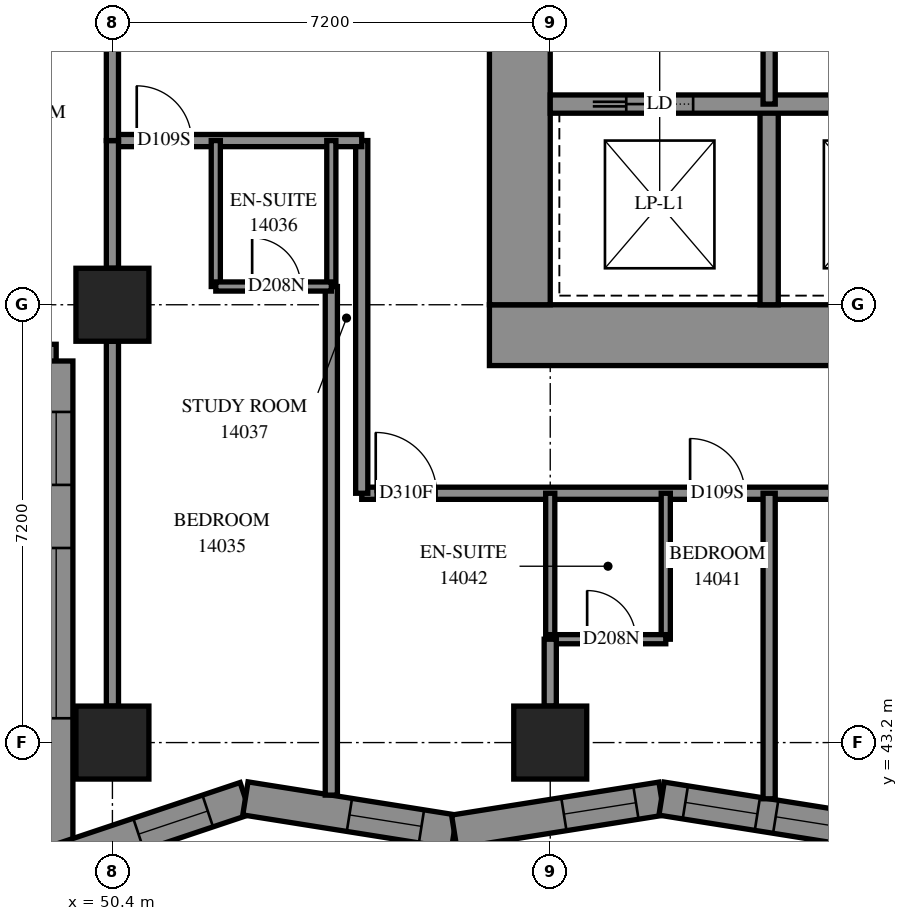
"""IFC4 building model, lengths in metres.
Left out: names, types, materials, properties, quantities, classifications, styles, units other than length and angle.
Written with IfcOpenShell. Run it as: python <this file> out.ifc"""

import sys

from ifc_helpers import new_model, si_unit, direction, frame, frame_2d, origin, origin_2d, place, context, subcontext, project, spatial, polyline, rectangle, outline, extrude, element, fill, save


model = new_model("IFC4")
c1 = context("Model", 3, precision=1e-05, world=origin(), true_north=direction((0.0, 1.0)))
c2 = subcontext(c1, "Body", "Model", "MODEL_VIEW")
j1 = project(units=[si_unit("LENGTHUNIT", "METRE"), si_unit("PLANEANGLEUNIT", "RADIAN")], contexts=[c1])
p1 = place(None, origin())
s1 = spatial("IfcSite", under=j1, at=p1, CompositionType="ELEMENT")
p2 = place(p1, origin())
s2 = spatial("IfcBuilding", under=s1, at=p2, CompositionType="ELEMENT")
p3 = place(p2, frame((0.0, 0.0, 54.2)))
s3 = spatial("IfcBuildingStorey", under=s2, at=p3, CompositionType="ELEMENT", Elevation=54.2)
for number, where, z_axis, x_axis in (
    (1, (50.4, 43.2, 0.0), (0.0, 0.0, 1.0), (1.0, 0.0, 0.0)),
    (2, (50.4, 50.4, 0.0), (0.0, 0.0, 1.0), (1.0, 0.0, 0.0)),
    (3, (57.6, 43.2, 0.0), (0.0, 0.0, 1.0), (1.0, 0.0, 0.0)),
):
    element("IfcColumn", number, at=place(p3, frame(where, z_axis=z_axis, x_axis=x_axis)), inside=s3, PredefinedType="COLUMN", context=c2, shape_type="SweptSolid", body=[
        extrude(rectangle(XDim=1.2, YDim=1.2, at=origin_2d()), origin(), (0.0, 0.0, 1.0), 3.1),
    ])
p4 = place(p3, frame((56.6, 49.9, -0.3), z_axis=(0.0, 0.0, 1.0), x_axis=(1.0, 0.0, 0.0)))
e4 = element("IfcWall", 4, at=p4, inside=s3, PredefinedType="SHEAR", context=c2, shape_type="SweptSolid", body=[
    extrude(rectangle(XDim=16.4, YDim=1.0, at=frame_2d((8.2, 0.0))), origin(), (0.0, 0.0, 1.0), 2.7),
])
p5 = place(p3, frame((57.1, 50.4, -0.3), z_axis=(0.0, 0.0, 1.0), x_axis=(0.0, 1.0, 0.0)))
e5 = element("IfcWall", 5, at=p5, inside=s3, PredefinedType="SHEAR", context=c2, shape_type="SweptSolid", body=[
    extrude(rectangle(XDim=14.4, YDim=1.0, at=frame_2d((7.2, 0.0))), origin(), (0.0, 0.0, 1.0), 2.7),
])
p6 = place(p5, frame((4.55, 0.0, 0.3)))
e6 = element("IfcOpeningElement", 6, at=p6, cuts=e5, PredefinedType="OPENING", context=c2, shape_type="SweptSolid", body=[
    extrude(rectangle(XDim=1.1, YDim=2.1, at=frame_2d((0.55, 1.05))), frame((0.0, 0.51, 0.0), z_axis=(0.0, -1.0, 0.0), x_axis=(1.0, 0.0, 0.0)), (0.0, 0.0, 1.0), 1.02),
])
p7 = place(p5, frame((11.35, 0.0, 0.3)))
e7 = element("IfcOpeningElement", 7, at=p7, cuts=e5, PredefinedType="OPENING", context=c2, shape_type="SweptSolid", body=[
    extrude(rectangle(XDim=1.1, YDim=2.1, at=frame_2d((0.55, 1.05))), frame((0.0, 0.51, 0.0), z_axis=(0.0, -1.0, 0.0), x_axis=(1.0, 0.0, 0.0)), (0.0, 0.0, 1.0), 1.02),
])
p8 = place(p3, frame((61.2, 50.4, 0.0), z_axis=(0.0, 0.0, 1.0), x_axis=(0.0, 1.0, 0.0)))
e8 = element("IfcWall", 8, at=p8, inside=s3, PredefinedType="SOLIDWALL", context=c2, shape_type="SweptSolid", body=[
    extrude(rectangle(XDim=3.3, YDim=0.3, at=frame_2d((1.65, 0.0))), origin(), (0.0, 0.0, 1.0), 3.1),
])
p9 = place(p3, frame((57.6, 53.7, 0.0), z_axis=(0.0, 0.0, 1.0), x_axis=(1.0, 0.0, 0.0)))
e9 = element("IfcWall", 9, at=p9, inside=s3, PredefinedType="SOLIDWALL", context=c2, shape_type="SweptSolid", body=[
    extrude(rectangle(XDim=14.4, YDim=0.3, at=frame_2d((7.2, 0.0))), origin(), (0.0, 0.0, 1.0), 3.1),
])
p10 = place(p9, frame((1.25, 0.0, 0.0)))
e10 = element("IfcOpeningElement", 10, at=p10, cuts=e9, PredefinedType="OPENING", context=c2, shape_type="SweptSolid", body=[
    extrude(rectangle(XDim=1.1, YDim=2.1, at=frame_2d((0.55, 1.05))), frame((0.0, 0.16, 0.0), z_axis=(0.0, -1.0, 0.0), x_axis=(1.0, 0.0, 0.0)), (0.0, 0.0, 1.0), 0.32),
])
p11 = place(p9, frame((4.85, 0.0, 0.0)))
e11 = element("IfcOpeningElement", 11, at=p11, cuts=e9, PredefinedType="OPENING", context=c2, shape_type="SweptSolid", body=[
    extrude(rectangle(XDim=1.1, YDim=2.1, at=frame_2d((0.55, 1.05))), frame((0.0, 0.16, 0.0), z_axis=(0.0, -1.0, 0.0), x_axis=(1.0, 0.0, 0.0)), (0.0, 0.0, 1.0), 0.32),
])
p12 = place(p9, frame((8.45, 0.0, 0.0)))
e12 = element("IfcOpeningElement", 12, at=p12, cuts=e9, PredefinedType="OPENING", context=c2, shape_type="SweptSolid", body=[
    extrude(rectangle(XDim=1.1, YDim=2.1, at=frame_2d((0.55, 1.05))), frame((0.0, 0.16, 0.0), z_axis=(0.0, -1.0, 0.0), x_axis=(1.0, 0.0, 0.0)), (0.0, 0.0, 1.0), 0.32),
])
p13 = place(p9, frame((12.05, 0.0, 0.0)))
e13 = element("IfcOpeningElement", 13, at=p13, cuts=e9, PredefinedType="OPENING", context=c2, shape_type="SweptSolid", body=[
    extrude(rectangle(XDim=1.1, YDim=2.1, at=frame_2d((0.55, 1.05))), frame((0.0, 0.16, 0.0), z_axis=(0.0, -1.0, 0.0), x_axis=(1.0, 0.0, 0.0)), (0.0, 0.0, 1.0), 0.32),
])
p14 = place(p3, frame((42.275, 49.475, 0.0), z_axis=(0.0, 0.0, 1.0), x_axis=(1.0, 0.0, 0.0)))
e14 = element("IfcWall", 14, at=p14, inside=s3, PredefinedType="SOLIDWALL", context=c2, shape_type="SweptSolid", body=[
    extrude(outline(polyline([(-0.275, -0.275), (6.925, -0.275), (7.475, 0.275), (0.275, 0.275), (-0.275, -0.275)])), origin(), (0.0, 0.0, 1.0), 3.1),
])
p15 = place(p14, frame((1.325, 0.0, 0.5)))
e15 = element("IfcOpeningElement", 15, at=p15, cuts=e14, PredefinedType="OPENING", context=c2, shape_type="SweptSolid", body=[
    extrude(rectangle(XDim=2.8, YDim=2.45, at=frame_2d((1.4, 1.225))), frame((0.0, 0.285, 0.0), z_axis=(0.0, -1.0, 0.0), x_axis=(1.0, 0.0, 0.0)), (0.0, 0.0, 1.0), 0.57),
])
p16 = place(p14, frame((5.162, 0.0, 0.5)))
e16 = element("IfcOpeningElement", 16, at=p16, cuts=e14, PredefinedType="OPENING", context=c2, shape_type="SweptSolid", body=[
    extrude(rectangle(XDim=1.2, YDim=2.45, at=frame_2d((0.6, 1.225))), frame((0.0, 0.285, 0.0), z_axis=(0.0, -1.0, 0.0), x_axis=(1.0, 0.0, 0.0)), (0.0, 0.0, 1.0), 0.57),
])
p17 = place(p3, frame((49.475, 49.475, 0.0), z_axis=(0.0, 0.0, 1.0), x_axis=(0.0, -1.0, 0.0)))
e17 = element("IfcWall", 17, at=p17, inside=s3, PredefinedType="SOLIDWALL", context=c2, shape_type="SweptSolid", body=[
    extrude(outline(polyline([(0.275, -0.275), (8.617, -0.275), (7.853, 0.275), (-0.275, 0.275), (0.275, -0.275)])), origin(), (0.0, 0.0, 1.0), 3.1),
])
p18 = place(p17, frame((3.075, 0.0, 0.5)))
e18 = element("IfcOpeningElement", 18, at=p18, cuts=e17, PredefinedType="OPENING", context=c2, shape_type="SweptSolid", body=[
    extrude(rectangle(XDim=2.8, YDim=2.45, at=frame_2d((1.4, 1.225))), frame((0.0, 0.285, 0.0), z_axis=(0.0, -1.0, 0.0), x_axis=(1.0, 0.0, 0.0)), (0.0, 0.0, 1.0), 0.57),
])
p19 = place(p17, frame((0.838, 0.0, 0.5)))
e19 = element("IfcOpeningElement", 19, at=p19, cuts=e17, PredefinedType="OPENING", context=c2, shape_type="SweptSolid", body=[
    extrude(rectangle(XDim=1.2, YDim=2.45, at=frame_2d((0.6, 1.225))), frame((0.0, 0.285, 0.0), z_axis=(0.0, -1.0, 0.0), x_axis=(1.0, 0.0, 0.0)), (0.0, 0.0, 1.0), 0.57),
])
p20 = place(p3, frame((49.475, 41.24, 0.0), z_axis=(0.0, 0.0, 1.0), x_axis=(0.9482466671, 0.3175346568, 0.0)))
e20 = element("IfcWall", 20, at=p20, inside=s3, PredefinedType="SOLIDWALL", context=c2, shape_type="SweptSolid", body=[
    extrude(outline(polyline([(-0.382, -0.275), (3.214, -0.275), (3.349, 0.275), (0.382, 0.275), (-0.382, -0.275)])), origin(), (0.0, 0.0, 1.0), 3.1),
])
p21 = place(p20, frame((1.429, 0.0, 0.5)))
e21 = element("IfcOpeningElement", 21, at=p21, cuts=e20, PredefinedType="OPENING", context=c2, shape_type="SweptSolid", body=[
    extrude(rectangle(XDim=1.2, YDim=2.45, at=frame_2d((0.6, 1.225))), frame((0.0, 0.285, 0.0), z_axis=(0.0, -1.0, 0.0), x_axis=(1.0, 0.0, 0.0)), (0.0, 0.0, 1.0), 0.57),
])
p22 = place(p3, frame((52.587, 42.282, 0.0), z_axis=(0.0, 0.0, 1.0), x_axis=(0.9876057519, -0.1569550219, 0.0)))
e22 = element("IfcWall", 22, at=p22, inside=s3, PredefinedType="SOLIDWALL", context=c2, shape_type="SweptSolid", body=[
    extrude(outline(polyline([(0.067, -0.275), (3.521, -0.275), (3.433, 0.275), (-0.067, 0.275), (0.067, -0.275)])), origin(), (0.0, 0.0, 1.0), 3.1),
])
p23 = place(p22, frame((1.732, 0.0, 0.5)))
e23 = element("IfcOpeningElement", 23, at=p23, cuts=e22, PredefinedType="OPENING", context=c2, shape_type="SweptSolid", body=[
    extrude(rectangle(XDim=1.2, YDim=2.45, at=frame_2d((0.6, 1.225))), frame((0.0, 0.285, 0.0), z_axis=(0.0, -1.0, 0.0), x_axis=(1.0, 0.0, 0.0)), (0.0, 0.0, 1.0), 0.57),
])
p24 = place(p3, frame((56.021, 41.736, 0.0), z_axis=(0.0, 0.0, 1.0), x_axis=(0.9876056196, 0.1569558544, 0.0)))
e24 = element("IfcWall", 24, at=p24, inside=s3, PredefinedType="SOLIDWALL", context=c2, shape_type="SweptSolid", body=[
    extrude(outline(polyline([(-0.044, -0.275), (3.409, -0.275), (3.497, 0.275), (0.044, 0.275), (-0.044, -0.275)])), origin(), (0.0, 0.0, 1.0), 3.1),
])
p25 = place(p24, frame((1.826, 0.0, 0.5)))
e25 = element("IfcOpeningElement", 25, at=p25, cuts=e24, PredefinedType="OPENING", context=c2, shape_type="SweptSolid", body=[
    extrude(rectangle(XDim=1.2, YDim=2.45, at=frame_2d((0.6, 1.225))), frame((0.0, 0.285, 0.0), z_axis=(0.0, -1.0, 0.0), x_axis=(1.0, 0.0, 0.0)), (0.0, 0.0, 1.0), 0.57),
])
p26 = place(p3, frame((59.431, 42.279, 0.0), z_axis=(0.0, 0.0, 1.0), x_axis=(0.9876049061, -0.1569603434, 0.0)))
e26 = element("IfcWall", 26, at=p26, inside=s3, PredefinedType="SOLIDWALL", context=c2, shape_type="SweptSolid", body=[
    extrude(outline(polyline([(0.044, -0.275), (3.497, -0.275), (3.409, 0.275), (-0.044, 0.275), (0.044, -0.275)])), origin(), (0.0, 0.0, 1.0), 3.1),
])
p27 = place(p26, frame((0.396, 0.0, 0.5)))
e27 = element("IfcOpeningElement", 27, at=p27, cuts=e26, PredefinedType="OPENING", context=c2, shape_type="SweptSolid", body=[
    extrude(rectangle(XDim=1.2, YDim=2.45, at=frame_2d((0.6, 1.225))), frame((0.0, 0.285, 0.0), z_axis=(0.0, -1.0, 0.0), x_axis=(1.0, 0.0, 0.0)), (0.0, 0.0, 1.0), 0.57),
])
p28 = place(p26, frame((1.9, 0.0, 0.5)))
e28 = element("IfcOpeningElement", 28, at=p28, cuts=e26, PredefinedType="OPENING", context=c2, shape_type="SweptSolid", body=[
    extrude(rectangle(XDim=1.2, YDim=2.45, at=frame_2d((0.6, 1.225))), frame((0.0, 0.285, 0.0), z_axis=(0.0, -1.0, 0.0), x_axis=(1.0, 0.0, 0.0)), (0.0, 0.0, 1.0), 0.57),
])
p29 = place(p3, frame((61.2, 53.7, 0.0), z_axis=(0.0, 0.0, 1.0), x_axis=(0.0, 1.0, 0.0)))
e29 = element("IfcWall", 29, at=p29, inside=s3, PredefinedType="PARTITIONING", context=c2, shape_type="SweptSolid", body=[
    extrude(rectangle(XDim=3.6, YDim=0.2, at=frame_2d((1.8, 0.0))), origin(), (0.0, 0.0, 1.0), 3.1),
])
p30 = place(p3, frame((54.5, 47.3, 0.0), z_axis=(0.0, 0.0, 1.0), x_axis=(1.0, 0.0, 0.0)))
e30 = element("IfcWall", 30, at=p30, inside=s3, PredefinedType="PARTITIONING", context=c2, shape_type="SweptSolid", body=[
    extrude(rectangle(XDim=19.56, YDim=0.2, at=frame_2d((9.78, 0.0))), origin(), (0.0, 0.0, 1.0), 3.1),
])
p31 = place(p30, frame((0.23, 0.0, 0.0)))
e31 = element("IfcOpeningElement", 31, at=p31, cuts=e30, PredefinedType="OPENING", context=c2, shape_type="SweptSolid", body=[
    extrude(rectangle(XDim=1.0, YDim=2.1, at=frame_2d((0.5, 1.05))), frame((0.0, 0.11, 0.0), z_axis=(0.0, -1.0, 0.0), x_axis=(1.0, 0.0, 0.0)), (0.0, 0.0, 1.0), 0.22),
])
p32 = place(p30, frame((5.4, 0.0, 0.0)))
e32 = element("IfcOpeningElement", 32, at=p32, cuts=e30, PredefinedType="OPENING", context=c2, shape_type="SweptSolid", body=[
    extrude(rectangle(XDim=0.9, YDim=2.1, at=frame_2d((0.45, 1.05))), frame((0.0, 0.11, 0.0), z_axis=(0.0, -1.0, 0.0), x_axis=(1.0, 0.0, 0.0)), (0.0, 0.0, 1.0), 0.22),
])
p33 = place(p30, frame((9.001, 0.0, 0.0)))
e33 = element("IfcOpeningElement", 33, at=p33, cuts=e30, PredefinedType="OPENING", context=c2, shape_type="SweptSolid", body=[
    extrude(rectangle(XDim=0.9, YDim=2.1, at=frame_2d((0.45, 1.05))), frame((0.0, 0.11, 0.0), z_axis=(0.0, -1.0, 0.0), x_axis=(1.0, 0.0, 0.0)), (0.0, 0.0, 1.0), 0.22),
])
p34 = place(p30, frame((14.3, 0.0, 0.0)))
e34 = element("IfcOpeningElement", 34, at=p34, cuts=e30, PredefinedType="OPENING", context=c2, shape_type="SweptSolid", body=[
    extrude(rectangle(XDim=0.9, YDim=2.1, at=frame_2d((0.45, 1.05))), frame((0.0, 0.11, 0.0), z_axis=(0.0, -1.0, 0.0), x_axis=(1.0, 0.0, 0.0)), (0.0, 0.0, 1.0), 0.22),
])
p35 = place(p3, frame((54.0, 42.336, 0.0), z_axis=(0.0, 0.0, 1.0), x_axis=(0.0, 1.0, 0.0)))
e35 = element("IfcWall", 35, at=p35, inside=s3, PredefinedType="PARTITIONING", context=c2, shape_type="SweptSolid", body=[
    extrude(rectangle(XDim=8.364, YDim=0.2, at=frame_2d((4.182, 0.0))), origin(), (0.0, 0.0, 1.0), 3.1),
])
p36 = place(p3, frame((50.4, 43.8, 0.0), z_axis=(0.0, 0.0, 1.0), x_axis=(0.0, 1.0, 0.0)))
e36 = element("IfcWall", 36, at=p36, inside=s3, PredefinedType="PARTITIONING", context=c2, shape_type="SweptSolid", body=[
    extrude(rectangle(XDim=6.0, YDim=0.2, at=frame_2d((3.0, 0.0))), origin(), (0.0, 0.0, 1.0), 2.6),
])
p37 = place(p3, frame((54.5, 47.3, 0.0), z_axis=(0.0, 0.0, 1.0), x_axis=(0.0, 1.0, 0.0)))
e37 = element("IfcWall", 37, at=p37, inside=s3, PredefinedType="PARTITIONING", context=c2, shape_type="SweptSolid", body=[
    extrude(rectangle(XDim=5.8, YDim=0.2, at=frame_2d((2.9, 0.0))), origin(), (0.0, 0.0, 1.0), 3.1),
])
p38 = place(p3, frame((61.2, 42.276, 0.0), z_axis=(0.0, 0.0, 1.0), x_axis=(0.0, 1.0, 0.0)))
e38 = element("IfcWall", 38, at=p38, inside=s3, PredefinedType="PARTITIONING", context=c2, shape_type="SweptSolid", body=[
    extrude(rectangle(XDim=5.024, YDim=0.2, at=frame_2d((2.512, 0.0))), origin(), (0.0, 0.0, 1.0), 3.1),
])
p39 = place(p3, frame((50.4, 53.1, 0.0), z_axis=(0.0, 0.0, 1.0), x_axis=(1.0, 0.0, 0.0)))
e39 = element("IfcWall", 39, at=p39, inside=s3, PredefinedType="PARTITIONING", context=c2, shape_type="SweptSolid", body=[
    extrude(rectangle(XDim=4.1, YDim=0.2, at=frame_2d((2.05, 0.0))), origin(), (0.0, 0.0, 1.0), 3.1),
])
p40 = place(p39, frame((0.4, 0.0, 0.0)))
e40 = element("IfcOpeningElement", 40, at=p40, cuts=e39, PredefinedType="OPENING", context=c2, shape_type="SweptSolid", body=[
    extrude(rectangle(XDim=0.9, YDim=2.1, at=frame_2d((0.45, 1.05))), frame((0.0, 0.11, 0.0), z_axis=(0.0, -1.0, 0.0), x_axis=(1.0, 0.0, 0.0)), (0.0, 0.0, 1.0), 0.22),
])
for number, where, z_axis, x_axis in (
    (41, (52.1, 50.7, 0.0), (0.0, 0.0, 1.0), (0.0, 1.0, 0.0)),
    (42, (54.0, 50.7, 0.0), (0.0, 0.0, 1.0), (0.0, 1.0, 0.0)),
    (43, (59.5, 44.9, 0.0), (0.0, 0.0, 1.0), (0.0, 1.0, 0.0)),
    (44, (57.6, 44.9, 0.0), (0.0, 0.0, 1.0), (0.0, 1.0, 0.0)),
):
    element("IfcWall", number, at=place(p3, frame(where, z_axis=z_axis, x_axis=x_axis)), inside=s3, PredefinedType="PARTITIONING", context=c2, shape_type="SweptSolid", body=[
        extrude(rectangle(XDim=2.4, YDim=0.15, at=frame_2d((1.2, 0.0))), origin(), (0.0, 0.0, 1.0), 3.1),
    ])
p41 = place(p3, frame((50.4, 51.0, 0.0), z_axis=(0.0, 0.0, 1.0), x_axis=(0.0, 1.0, 0.0)))
e45 = element("IfcWall", 45, at=p41, inside=s3, PredefinedType="PARTITIONING", context=c2, shape_type="SweptSolid", body=[
    extrude(rectangle(XDim=2.1, YDim=0.2, at=frame_2d((1.05, 0.0))), origin(), (0.0, 0.0, 1.0), 3.1),
])
p42 = place(p3, frame((52.1, 50.7, 0.0), z_axis=(0.0, 0.0, 1.0), x_axis=(1.0, 0.0, 0.0)))
e46 = element("IfcWall", 46, at=p42, inside=s3, PredefinedType="PARTITIONING", context=c2, shape_type="SweptSolid", body=[
    extrude(rectangle(XDim=1.9, YDim=0.15, at=frame_2d((0.95, 0.0))), origin(), (0.0, 0.0, 1.0), 3.1),
])
p43 = place(p42, frame((0.598, 0.0, 0.0)))
e47 = element("IfcOpeningElement", 47, at=p43, cuts=e46, PredefinedType="OPENING", context=c2, shape_type="SweptSolid", body=[
    extrude(rectangle(XDim=0.8, YDim=2.1, at=frame_2d((0.4, 1.05))), frame((0.0, 0.085, 0.0), z_axis=(0.0, -1.0, 0.0), x_axis=(1.0, 0.0, 0.0)), (0.0, 0.0, 1.0), 0.17),
])
p44 = place(p3, frame((57.6, 44.9, 0.0), z_axis=(0.0, 0.0, 1.0), x_axis=(1.0, 0.0, 0.0)))
e48 = element("IfcWall", 48, at=p44, inside=s3, PredefinedType="PARTITIONING", context=c2, shape_type="SweptSolid", body=[
    extrude(rectangle(XDim=1.9, YDim=0.15, at=frame_2d((0.95, 0.0))), origin(), (0.0, 0.0, 1.0), 3.1),
])
p45 = place(p44, frame((0.607, 0.0, 0.0)))
e49 = element("IfcOpeningElement", 49, at=p45, cuts=e48, PredefinedType="OPENING", context=c2, shape_type="SweptSolid", body=[
    extrude(rectangle(XDim=0.8, YDim=2.1, at=frame_2d((0.4, 1.05))), frame((0.0, 0.085, 0.0), z_axis=(0.0, -1.0, 0.0), x_axis=(1.0, 0.0, 0.0)), (0.0, 0.0, 1.0), 0.17),
])
p46 = place(p3, frame((50.4, 53.1, 0.0), z_axis=(0.0, 0.0, 1.0), x_axis=(0.0, 1.0, 0.0)))
e50 = element("IfcWall", 50, at=p46, inside=s3, PredefinedType="PARTITIONING", context=c2, shape_type="SweptSolid", body=[
    extrude(rectangle(XDim=1.8, YDim=0.2, at=frame_2d((0.9, 0.0))), origin(), (0.0, 0.0, 1.0), 3.1),
])
p47 = place(p3, frame((57.6, 43.8, 0.0), z_axis=(0.0, 0.0, 1.0), x_axis=(0.0, 1.0, 0.0)))
e51 = element("IfcWall", 51, at=p47, inside=s3, PredefinedType="PARTITIONING", context=c2, shape_type="SweptSolid", body=[
    extrude(rectangle(XDim=1.1, YDim=0.2, at=frame_2d((0.55, 0.0))), origin(), (0.0, 0.0, 1.0), 3.1),
])
p48 = place(p18, origin())
e52 = element("IfcWindow", 52, at=p48, inside=s3, PartitioningType="SINGLE_PANEL", PredefinedType="WINDOW", context=c2, shape_type="SweptSolid", body=[
    extrude(rectangle(XDim=2.8, YDim=2.45, at=frame_2d((1.4, 1.225))), frame((0.0, 0.155, 0.0), z_axis=(0.0, -1.0, 0.0), x_axis=(1.0, 0.0, 0.0)), (0.0, 0.0, 1.0), 0.06),
])
fill(e18, e52)
p49 = place(p19, origin())
e53 = element("IfcWindow", 53, at=p49, inside=s3, PartitioningType="SINGLE_PANEL", PredefinedType="WINDOW", context=c2, shape_type="SweptSolid", body=[
    extrude(rectangle(XDim=1.2, YDim=2.45, at=frame_2d((0.6, 1.225))), frame((0.0, 0.155, 0.0), z_axis=(0.0, -1.0, 0.0), x_axis=(1.0, 0.0, 0.0)), (0.0, 0.0, 1.0), 0.06),
])
fill(e19, e53)
p50 = place(p21, origin())
e54 = element("IfcWindow", 54, at=p50, inside=s3, PartitioningType="SINGLE_PANEL", PredefinedType="WINDOW", context=c2, shape_type="SweptSolid", body=[
    extrude(rectangle(XDim=1.2, YDim=2.45, at=frame_2d((0.6, 1.225))), frame((0.0, 0.155, 0.0), z_axis=(0.0, -1.0, 0.0), x_axis=(1.0, 0.0, 0.0)), (0.0, 0.0, 1.0), 0.06),
])
fill(e21, e54)
p51 = place(p23, origin())
e55 = element("IfcWindow", 55, at=p51, inside=s3, PartitioningType="SINGLE_PANEL", PredefinedType="WINDOW", context=c2, shape_type="SweptSolid", body=[
    extrude(rectangle(XDim=1.2, YDim=2.45, at=frame_2d((0.6, 1.225))), frame((0.0, 0.155, 0.0), z_axis=(0.0, -1.0, 0.0), x_axis=(1.0, 0.0, 0.0)), (0.0, 0.0, 1.0), 0.06),
])
fill(e23, e55)
p52 = place(p25, origin())
e56 = element("IfcWindow", 56, at=p52, inside=s3, PartitioningType="SINGLE_PANEL", PredefinedType="WINDOW", context=c2, shape_type="SweptSolid", body=[
    extrude(rectangle(XDim=1.2, YDim=2.45, at=frame_2d((0.6, 1.225))), frame((0.0, 0.155, 0.0), z_axis=(0.0, -1.0, 0.0), x_axis=(1.0, 0.0, 0.0)), (0.0, 0.0, 1.0), 0.06),
])
fill(e25, e56)
p53 = place(p27, origin())
e57 = element("IfcWindow", 57, at=p53, inside=s3, PartitioningType="SINGLE_PANEL", PredefinedType="WINDOW", context=c2, shape_type="SweptSolid", body=[
    extrude(rectangle(XDim=1.2, YDim=2.45, at=frame_2d((0.6, 1.225))), frame((0.0, 0.155, 0.0), z_axis=(0.0, -1.0, 0.0), x_axis=(1.0, 0.0, 0.0)), (0.0, 0.0, 1.0), 0.06),
])
fill(e27, e57)
p54 = place(p28, origin())
e58 = element("IfcWindow", 58, at=p54, inside=s3, PartitioningType="SINGLE_PANEL", PredefinedType="WINDOW", context=c2, shape_type="SweptSolid", body=[
    extrude(rectangle(XDim=1.2, YDim=2.45, at=frame_2d((0.6, 1.225))), frame((0.0, 0.155, 0.0), z_axis=(0.0, -1.0, 0.0), x_axis=(1.0, 0.0, 0.0)), (0.0, 0.0, 1.0), 0.06),
])
fill(e28, e58)
p55 = place(p10, origin())
e59 = element("IfcDoor", 59, at=p55, inside=s3, OperationType="SLIDING_TO_LEFT", PredefinedType="DOOR", context=c2, shape_type="SweptSolid", body=[
    extrude(rectangle(XDim=1.1, YDim=2.1, at=frame_2d((0.55, 1.05))), frame((0.0, 0.025, 0.0), z_axis=(0.0, -1.0, 0.0), x_axis=(1.0, 0.0, 0.0)), (0.0, 0.0, 1.0), 0.05),
])
fill(e10, e59)
p56 = place(p40, origin())
e60 = element("IfcDoor", 60, at=p56, inside=s3, OperationType="SINGLE_SWING_LEFT", PredefinedType="DOOR", context=c2, shape_type="SweptSolid", body=[
    extrude(rectangle(XDim=0.9, YDim=2.1, at=frame_2d((0.45, 1.05))), frame((0.0, 0.025, 0.0), z_axis=(0.0, -1.0, 0.0), x_axis=(1.0, 0.0, 0.0)), (0.0, 0.0, 1.0), 0.05),
])
fill(e40, e60)
p57 = place(p43, origin())
e61 = element("IfcDoor", 61, at=p57, inside=s3, OperationType="SINGLE_SWING_RIGHT", PredefinedType="DOOR", context=c2, shape_type="SweptSolid", body=[
    extrude(rectangle(XDim=0.8, YDim=2.1, at=frame_2d((0.4, 1.05))), frame((0.0, 0.025, 0.0), z_axis=(0.0, -1.0, 0.0), x_axis=(1.0, 0.0, 0.0)), (0.0, 0.0, 1.0), 0.05),
])
fill(e47, e61)
p58 = place(p31, origin())
e62 = element("IfcDoor", 62, at=p58, inside=s3, OperationType="SINGLE_SWING_RIGHT", PredefinedType="DOOR", context=c2, shape_type="SweptSolid", body=[
    extrude(rectangle(XDim=1.0, YDim=2.1, at=frame_2d((0.5, 1.05))), frame((0.0, 0.025, 0.0), z_axis=(0.0, -1.0, 0.0), x_axis=(1.0, 0.0, 0.0)), (0.0, 0.0, 1.0), 0.05),
])
fill(e31, e62)
p59 = place(p32, origin())
e63 = element("IfcDoor", 63, at=p59, inside=s3, OperationType="SINGLE_SWING_LEFT", PredefinedType="DOOR", context=c2, shape_type="SweptSolid", body=[
    extrude(rectangle(XDim=0.9, YDim=2.1, at=frame_2d((0.45, 1.05))), frame((0.0, 0.025, 0.0), z_axis=(0.0, -1.0, 0.0), x_axis=(1.0, 0.0, 0.0)), (0.0, 0.0, 1.0), 0.05),
])
fill(e32, e63)
p60 = place(p45, origin())
e64 = element("IfcDoor", 64, at=p60, inside=s3, OperationType="SINGLE_SWING_RIGHT", PredefinedType="DOOR", context=c2, shape_type="SweptSolid", body=[
    extrude(rectangle(XDim=0.8, YDim=2.1, at=frame_2d((0.4, 1.05))), frame((0.0, 0.025, 0.0), z_axis=(0.0, -1.0, 0.0), x_axis=(1.0, 0.0, 0.0)), (0.0, 0.0, 1.0), 0.05),
])
fill(e49, e64)
save(model, sys.argv[1])
